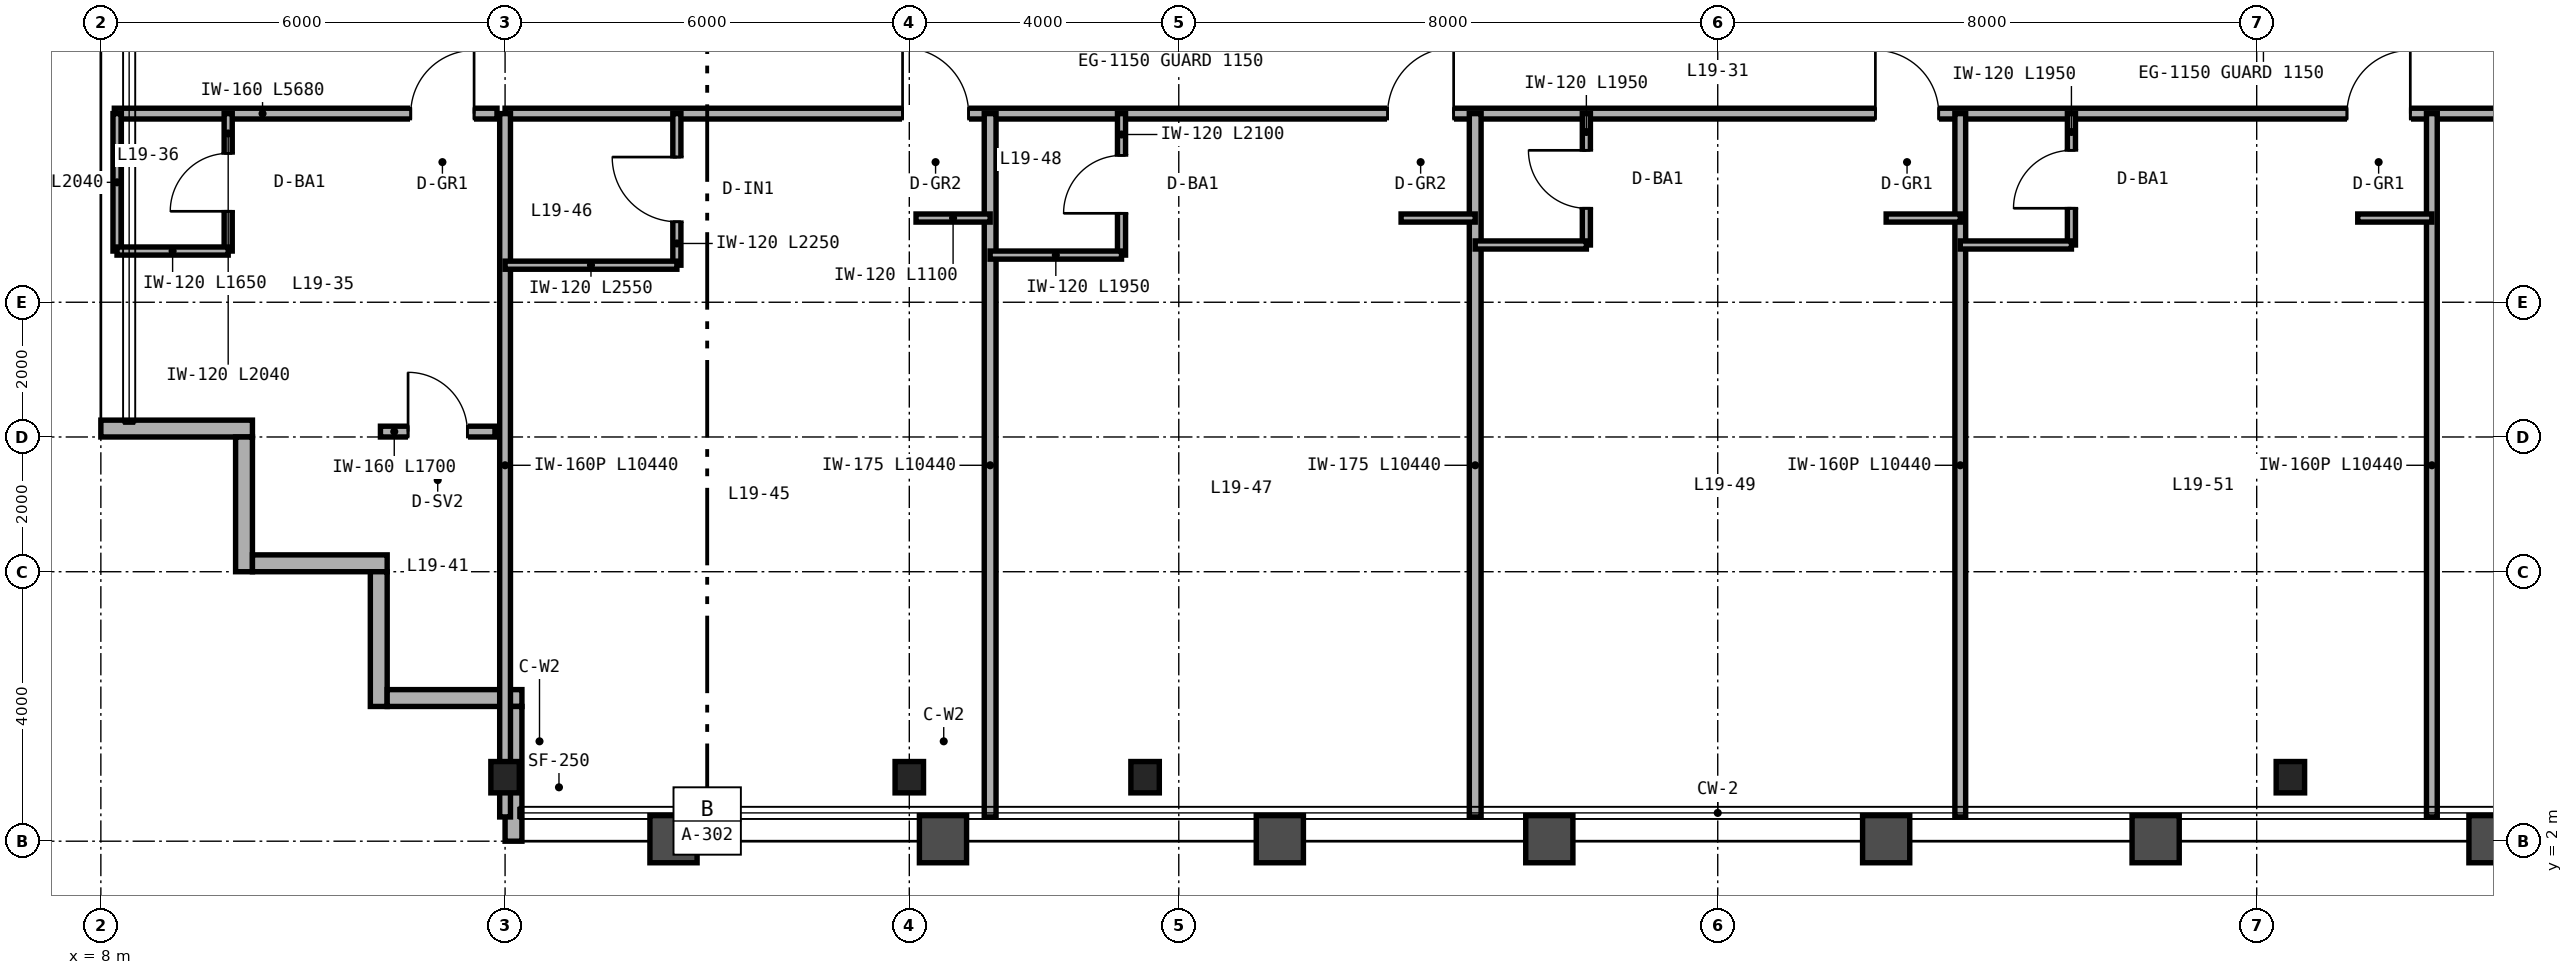
"""IFC4 building model, lengths in metres.
Left out: names, types, materials, properties, quantities, classifications, styles, units other than length and angle.
Written with IfcOpenShell. Run it as: python <this file> out.ifc"""

import sys

from ifc_helpers import new_model, si_unit, direction, frame, frame_2d, origin, origin_2d, place, context, subcontext, project, spatial, rectangle, i_section, extrude, source, transform, mapped, element, fill, save


model = new_model("IFC4")
c1 = context("Model", 3, precision=1e-05, world=origin(), true_north=direction((0.0, 1.0)))
c2 = subcontext(c1, "Body", "Model", "MODEL_VIEW")
j1 = project(units=[si_unit("LENGTHUNIT", "METRE"), si_unit("PLANEANGLEUNIT", "RADIAN")], contexts=[c1])
p1 = place(None, origin())
s1 = spatial("IfcSite", under=j1, at=p1, CompositionType="ELEMENT")
p2 = place(p1, origin())
s2 = spatial("IfcBuilding", under=s1, at=p2, CompositionType="ELEMENT")
p3 = place(p2, frame((0.0, 0.0, 78.0)))
s3 = spatial("IfcBuildingStorey", under=s2, at=p3, CompositionType="ELEMENT", Elevation=78.0)
m1 = source(origin(), c2, "Body", "SweptSolid", [
    extrude(i_section(OverallWidth=0.422, OverallDepth=0.465, WebThickness=0.045, FlangeThickness=0.073, FilletRadius=0.025, at=origin_2d()), origin(), (0.0, 0.0, 1.0), 3.35),
])
for number, where, z_axis, x_axis in (
    (1, (14.0, 2.95, 0.0), (0.0, 0.0, 1.0), (1.0, 0.0, 0.0)),
    (2, (20.0, 2.95, 0.0), (0.0, 0.0, 1.0), (1.0, 0.0, 0.0)),
    (3, (23.5, 2.95, 0.0), (0.0, 0.0, 1.0), (1.0, 0.0, 0.0)),
    (4, (40.5, 2.95, 0.0), (0.0, 0.0, 1.0), (1.0, 0.0, 0.0)),
):
    element("IfcColumn", number, at=place(p3, frame(where, z_axis=z_axis, x_axis=x_axis)), inside=s3, PredefinedType="COLUMN", context=c2, shape_type="MappedRepresentation", body=[
        mapped(m1, transform((0.0, 0.0, 0.0), scale=1.0)),
    ])
p4 = place(p3, frame((8.0, 8.125, 0.0), z_axis=(0.0, 0.0, 1.0), x_axis=(1.0, 0.0, 0.0)))
e5 = element("IfcWall", 5, at=p4, inside=s3, PredefinedType="SOLIDWALL", context=c2, shape_type="SweptSolid", body=[
    extrude(rectangle(XDim=2.25, YDim=0.25, at=frame_2d((1.125, 0.0))), origin(), (0.0, 0.0, 1.0), 3.35),
])
for number, where, z_axis, x_axis in (
    (6, (10.125, 8.0, 0.0), (0.0, 0.0, 1.0), (0.0, -1.0, 0.0)),
    (7, (10.25, 6.125, 0.0), (0.0, 0.0, 1.0), (1.0, 0.0, 0.0)),
    (8, (12.125, 6.0, 0.0), (0.0, 0.0, 1.0), (0.0, -1.0, 0.0)),
    (9, (12.25, 4.125, 0.0), (0.0, 0.0, 1.0), (1.0, 0.0, 0.0)),
):
    element("IfcWall", number, at=place(p3, frame(where, z_axis=z_axis, x_axis=x_axis)), inside=s3, PredefinedType="SOLIDWALL", context=c2, shape_type="SweptSolid", body=[
        extrude(rectangle(XDim=2.0, YDim=0.25, at=frame_2d((1.0, 0.0))), origin(), (0.0, 0.0, 1.0), 3.35),
    ])
p5 = place(p3, frame((14.125, 4.0, 0.0), z_axis=(0.0, 0.0, 1.0), x_axis=(0.0, -1.0, 0.0)))
e10 = element("IfcWall", 10, at=p5, inside=s3, PredefinedType="SOLIDWALL", context=c2, shape_type="SweptSolid", body=[
    extrude(rectangle(XDim=2.0, YDim=0.25, at=frame_2d((1.0, 0.0))), origin(), (0.0, 0.0, 1.0), 2.657),
])
p6 = place(p3, frame((8.2, 12.8, 0.0), z_axis=(0.0, 0.0, 1.0), x_axis=(1.0, 0.0, 0.0)))
e11 = element("IfcWall", 11, at=p6, inside=s3, PredefinedType="PARTITIONING", context=c2, shape_type="SweptSolid", body=[
    extrude(rectangle(XDim=5.68, YDim=0.16, at=frame_2d((2.84, 0.0))), origin(), (0.0, 0.0, 1.0), 3.35),
])
p7 = place(p6, frame((4.4, 0.0, 0.0)))
e12 = element("IfcOpeningElement", 12, at=p7, cuts=e11, PredefinedType="OPENING", context=c2, shape_type="SweptSolid", body=[
    extrude(rectangle(XDim=0.94, YDim=2.15, at=frame_2d((0.47, 1.075))), frame((0.0, 0.09, 0.0), z_axis=(0.0, -1.0, 0.0), x_axis=(1.0, 0.0, 0.0)), (0.0, 0.0, 1.0), 0.18),
])
p8 = place(p3, frame((9.89, 10.76, 0.0), z_axis=(0.0, 0.0, 1.0), x_axis=(0.0, 1.0, 0.0)))
e13 = element("IfcWall", 13, at=p8, inside=s3, PredefinedType="PARTITIONING", context=c2, shape_type="SweptSolid", body=[
    extrude(rectangle(XDim=2.04, YDim=0.12, at=frame_2d((1.02, 0.0))), origin(), (0.0, 0.0, 1.0), 3.35),
])
p9 = place(p8, frame((0.59, 0.0, 0.0)))
e14 = element("IfcOpeningElement", 14, at=p9, cuts=e13, PredefinedType="OPENING", context=c2, shape_type="SweptSolid", body=[
    extrude(rectangle(XDim=0.86, YDim=2.1, at=frame_2d((0.43, 1.05))), frame((0.0, 0.07, 0.0), z_axis=(0.0, -1.0, 0.0), x_axis=(1.0, 0.0, 0.0)), (0.0, 0.0, 1.0), 0.14),
])
p10 = place(p3, frame((8.24, 10.76, 0.0), z_axis=(0.0, 0.0, 1.0), x_axis=(0.0, 1.0, 0.0)))
e15 = element("IfcWall", 15, at=p10, inside=s3, PredefinedType="PARTITIONING", context=c2, shape_type="SweptSolid", body=[
    extrude(rectangle(XDim=2.04, YDim=0.12, at=frame_2d((1.02, 0.0))), origin(), (0.0, 0.0, 1.0), 3.35),
])
p11 = place(p3, frame((8.24, 10.76, 0.0), z_axis=(0.0, 0.0, 1.0), x_axis=(1.0, 0.0, 0.0)))
e16 = element("IfcWall", 16, at=p11, inside=s3, PredefinedType="PARTITIONING", context=c2, shape_type="SweptSolid", body=[
    extrude(rectangle(XDim=1.65, YDim=0.12, at=frame_2d((0.825, 0.0))), origin(), (0.0, 0.0, 1.0), 3.35),
])
p12 = place(p3, frame((12.15, 8.08, 0.0), z_axis=(0.0, 0.0, 1.0), x_axis=(1.0, 0.0, 0.0)))
e17 = element("IfcWall", 17, at=p12, inside=s3, PredefinedType="PARTITIONING", context=c2, shape_type="SweptSolid", body=[
    extrude(rectangle(XDim=1.7, YDim=0.16, at=frame_2d((0.85, 0.0))), origin(), (0.0, 0.0, 1.0), 3.35),
])
p13 = place(p12, frame((0.41, 0.0, 0.0)))
e18 = element("IfcOpeningElement", 18, at=p13, cuts=e17, PredefinedType="OPENING", context=c2, shape_type="SweptSolid", body=[
    extrude(rectangle(XDim=0.88, YDim=2.15, at=frame_2d((0.44, 1.075))), frame((0.0, 0.09, 0.0), z_axis=(0.0, -1.0, 0.0), x_axis=(1.0, 0.0, 0.0)), (0.0, 0.0, 1.0), 0.18),
])
p14 = place(p3, frame((14.0, 12.8, 0.0), z_axis=(0.0, 0.0, 1.0), x_axis=(1.0, 0.0, 0.0)))
e19 = element("IfcWall", 19, at=p14, inside=s3, PredefinedType="PARTITIONING", context=c2, shape_type="SweptSolid", body=[
    extrude(rectangle(XDim=36.0, YDim=0.16, at=frame_2d((18.0, 0.0))), origin(), (0.0, 0.0, 1.0), 2.571),
])
p15 = place(p14, frame((5.9, 0.0, 0.0)))
e20 = element("IfcOpeningElement", 20, at=p15, cuts=e19, PredefinedType="OPENING", context=c2, shape_type="SweptSolid", body=[
    extrude(rectangle(XDim=0.98, YDim=2.2, at=frame_2d((0.49, 1.1))), frame((0.0, 0.09, 0.0), z_axis=(0.0, -1.0, 0.0), x_axis=(1.0, 0.0, 0.0)), (0.0, 0.0, 1.0), 0.18),
])
p16 = place(p14, frame((13.1, 0.0, 0.0)))
e21 = element("IfcOpeningElement", 21, at=p16, cuts=e19, PredefinedType="OPENING", context=c2, shape_type="SweptSolid", body=[
    extrude(rectangle(XDim=0.98, YDim=2.2, at=frame_2d((0.49, 1.1))), frame((0.0, 0.09, 0.0), z_axis=(0.0, -1.0, 0.0), x_axis=(1.0, 0.0, 0.0)), (0.0, 0.0, 1.0), 0.18),
])
p17 = place(p14, frame((20.34, 0.0, 0.0)))
e22 = element("IfcOpeningElement", 22, at=p17, cuts=e19, PredefinedType="OPENING", context=c2, shape_type="SweptSolid", body=[
    extrude(rectangle(XDim=0.94, YDim=2.15, at=frame_2d((0.47, 1.075))), frame((0.0, 0.09, 0.0), z_axis=(0.0, -1.0, 0.0), x_axis=(1.0, 0.0, 0.0)), (0.0, 0.0, 1.0), 0.18),
])
p18 = place(p14, frame((27.34, 0.0, 0.0)))
e23 = element("IfcOpeningElement", 23, at=p18, cuts=e19, PredefinedType="OPENING", context=c2, shape_type="SweptSolid", body=[
    extrude(rectangle(XDim=0.94, YDim=2.15, at=frame_2d((0.47, 1.075))), frame((0.0, 0.09, 0.0), z_axis=(0.0, -1.0, 0.0), x_axis=(1.0, 0.0, 0.0)), (0.0, 0.0, 1.0), 0.18),
])
p19 = place(p14, frame((31.82, 0.0, 0.0)))
e24 = element("IfcOpeningElement", 24, at=p19, cuts=e19, PredefinedType="OPENING", context=c2, shape_type="SweptSolid", body=[
    extrude(rectangle(XDim=0.96, YDim=2.15, at=frame_2d((0.48, 1.075))), frame((0.0, 0.09, 0.0), z_axis=(0.0, -1.0, 0.0), x_axis=(1.0, 0.0, 0.0)), (0.0, 0.0, 1.0), 0.18),
])
p20 = place(p3, frame((14.0, 2.36, 0.0), z_axis=(0.0, 0.0, 1.0), x_axis=(0.0, 1.0, 0.0)))
e25 = element("IfcWall", 25, at=p20, inside=s3, PredefinedType="PARTITIONING", context=c2, shape_type="SweptSolid", body=[
    extrude(rectangle(XDim=10.44, YDim=0.16, at=frame_2d((5.22, 0.0))), origin(), (0.0, 0.0, 1.0), 2.657),
])
p21 = place(p3, frame((21.2, 2.36, 0.0), z_axis=(0.0, 0.0, 1.0), x_axis=(0.0, 1.0, 0.0)))
e26 = element("IfcWall", 26, at=p21, inside=s3, PredefinedType="PARTITIONING", context=c2, shape_type="SweptSolid", body=[
    extrude(rectangle(XDim=10.44, YDim=0.175, at=frame_2d((5.22, 0.0))), origin(), (0.0, 0.0, 1.0), 2.813),
])
p22 = place(p3, frame((16.55, 10.55, 0.0), z_axis=(0.0, 0.0, 1.0), x_axis=(0.0, 1.0, 0.0)))
e27 = element("IfcWall", 27, at=p22, inside=s3, PredefinedType="PARTITIONING", context=c2, shape_type="SweptSolid", body=[
    extrude(rectangle(XDim=2.25, YDim=0.12, at=frame_2d((1.125, 0.0))), origin(), (0.0, 0.0, 1.0), 3.35),
])
p23 = place(p22, frame((0.645, 0.0, 0.0)))
e28 = element("IfcOpeningElement", 28, at=p23, cuts=e27, PredefinedType="OPENING", context=c2, shape_type="SweptSolid", body=[
    extrude(rectangle(XDim=0.96, YDim=2.15, at=frame_2d((0.48, 1.075))), frame((0.0, 0.07, 0.0), z_axis=(0.0, -1.0, 0.0), x_axis=(1.0, 0.0, 0.0)), (0.0, 0.0, 1.0), 0.14),
])
p24 = place(p3, frame((14.0, 10.55, 0.0), z_axis=(0.0, 0.0, 1.0), x_axis=(1.0, 0.0, 0.0)))
e29 = element("IfcWall", 29, at=p24, inside=s3, PredefinedType="PARTITIONING", context=c2, shape_type="SweptSolid", body=[
    extrude(rectangle(XDim=2.55, YDim=0.12, at=frame_2d((1.275, 0.0))), origin(), (0.0, 0.0, 1.0), 3.35),
])
p25 = place(p3, frame((20.1, 11.25, 0.0), z_axis=(0.0, 0.0, 1.0), x_axis=(1.0, 0.0, 0.0)))
e30 = element("IfcWall", 30, at=p25, inside=s3, PredefinedType="PARTITIONING", context=c2, shape_type="SweptSolid", body=[
    extrude(rectangle(XDim=1.1, YDim=0.12, at=frame_2d((0.55, 0.0))), origin(), (0.0, 0.0, 1.0), 3.35),
])
p26 = place(p3, frame((28.4, 2.36, 0.0), z_axis=(0.0, 0.0, 1.0), x_axis=(0.0, 1.0, 0.0)))
e31 = element("IfcWall", 31, at=p26, inside=s3, PredefinedType="PARTITIONING", context=c2, shape_type="SweptSolid", body=[
    extrude(rectangle(XDim=10.44, YDim=0.175, at=frame_2d((5.22, 0.0))), origin(), (0.0, 0.0, 1.0), 2.423),
])
p27 = place(p3, frame((23.15, 10.7, 0.0), z_axis=(0.0, 0.0, 1.0), x_axis=(0.0, 1.0, 0.0)))
e32 = element("IfcWall", 32, at=p27, inside=s3, PredefinedType="PARTITIONING", context=c2, shape_type="SweptSolid", body=[
    extrude(rectangle(XDim=2.1, YDim=0.12, at=frame_2d((1.05, 0.0))), origin(), (0.0, 0.0, 1.0), 3.35),
])
p28 = place(p27, frame((0.62, 0.0, 0.0)))
e33 = element("IfcOpeningElement", 33, at=p28, cuts=e32, PredefinedType="OPENING", context=c2, shape_type="SweptSolid", body=[
    extrude(rectangle(XDim=0.86, YDim=2.1, at=frame_2d((0.43, 1.05))), frame((0.0, 0.07, 0.0), z_axis=(0.0, -1.0, 0.0), x_axis=(1.0, 0.0, 0.0)), (0.0, 0.0, 1.0), 0.14),
])
p29 = place(p3, frame((21.2, 10.7, 0.0), z_axis=(0.0, 0.0, 1.0), x_axis=(1.0, 0.0, 0.0)))
e34 = element("IfcWall", 34, at=p29, inside=s3, PredefinedType="PARTITIONING", context=c2, shape_type="SweptSolid", body=[
    extrude(rectangle(XDim=1.95, YDim=0.12, at=frame_2d((0.975, 0.0))), origin(), (0.0, 0.0, 1.0), 3.35),
])
p30 = place(p3, frame((27.3, 11.25, 0.0), z_axis=(0.0, 0.0, 1.0), x_axis=(1.0, 0.0, 0.0)))
e35 = element("IfcWall", 35, at=p30, inside=s3, PredefinedType="PARTITIONING", context=c2, shape_type="SweptSolid", body=[
    extrude(rectangle(XDim=1.1, YDim=0.12, at=frame_2d((0.55, 0.0))), origin(), (0.0, 0.0, 1.0), 3.35),
])
p31 = place(p3, frame((35.6, 2.36, 0.0), z_axis=(0.0, 0.0, 1.0), x_axis=(0.0, 1.0, 0.0)))
e36 = element("IfcWall", 36, at=p31, inside=s3, PredefinedType="PARTITIONING", context=c2, shape_type="SweptSolid", body=[
    extrude(rectangle(XDim=10.44, YDim=0.16, at=frame_2d((5.22, 0.0))), origin(), (0.0, 0.0, 1.0), 2.423),
])
p32 = place(p3, frame((30.05, 10.85, 0.0), z_axis=(0.0, 0.0, 1.0), x_axis=(0.0, 1.0, 0.0)))
e37 = element("IfcWall", 37, at=p32, inside=s3, PredefinedType="PARTITIONING", context=c2, shape_type="SweptSolid", body=[
    extrude(rectangle(XDim=1.95, YDim=0.12, at=frame_2d((0.975, 0.0))), origin(), (0.0, 0.0, 1.0), 3.35),
])
p33 = place(p32, frame((0.545, 0.0, 0.0)))
e38 = element("IfcOpeningElement", 38, at=p33, cuts=e37, PredefinedType="OPENING", context=c2, shape_type="SweptSolid", body=[
    extrude(rectangle(XDim=0.86, YDim=2.1, at=frame_2d((0.43, 1.05))), frame((0.0, 0.07, 0.0), z_axis=(0.0, -1.0, 0.0), x_axis=(1.0, 0.0, 0.0)), (0.0, 0.0, 1.0), 0.14),
])
p34 = place(p3, frame((28.4, 10.85, 0.0), z_axis=(0.0, 0.0, 1.0), x_axis=(1.0, 0.0, 0.0)))
e39 = element("IfcWall", 39, at=p34, inside=s3, PredefinedType="PARTITIONING", context=c2, shape_type="SweptSolid", body=[
    extrude(rectangle(XDim=1.65, YDim=0.12, at=frame_2d((0.825, 0.0))), origin(), (0.0, 0.0, 1.0), 3.35),
])
p35 = place(p3, frame((34.5, 11.25, 0.0), z_axis=(0.0, 0.0, 1.0), x_axis=(1.0, 0.0, 0.0)))
e40 = element("IfcWall", 40, at=p35, inside=s3, PredefinedType="PARTITIONING", context=c2, shape_type="SweptSolid", body=[
    extrude(rectangle(XDim=1.1, YDim=0.12, at=frame_2d((0.55, 0.0))), origin(), (0.0, 0.0, 1.0), 3.35),
])
p36 = place(p3, frame((42.6, 2.36, 0.0), z_axis=(0.0, 0.0, 1.0), x_axis=(0.0, 1.0, 0.0)))
e41 = element("IfcWall", 41, at=p36, inside=s3, PredefinedType="PARTITIONING", context=c2, shape_type="SweptSolid", body=[
    extrude(rectangle(XDim=10.44, YDim=0.16, at=frame_2d((5.22, 0.0))), origin(), (0.0, 0.0, 1.0), 2.813),
])
p37 = place(p3, frame((37.25, 10.85, 0.0), z_axis=(0.0, 0.0, 1.0), x_axis=(0.0, 1.0, 0.0)))
e42 = element("IfcWall", 42, at=p37, inside=s3, PredefinedType="PARTITIONING", context=c2, shape_type="SweptSolid", body=[
    extrude(rectangle(XDim=1.95, YDim=0.12, at=frame_2d((0.975, 0.0))), origin(), (0.0, 0.0, 1.0), 3.35),
])
p38 = place(p37, frame((0.545, 0.0, 0.0)))
e43 = element("IfcOpeningElement", 43, at=p38, cuts=e42, PredefinedType="OPENING", context=c2, shape_type="SweptSolid", body=[
    extrude(rectangle(XDim=0.86, YDim=2.1, at=frame_2d((0.43, 1.05))), frame((0.0, 0.07, 0.0), z_axis=(0.0, -1.0, 0.0), x_axis=(1.0, 0.0, 0.0)), (0.0, 0.0, 1.0), 0.14),
])
p39 = place(p3, frame((35.6, 10.85, 0.0), z_axis=(0.0, 0.0, 1.0), x_axis=(1.0, 0.0, 0.0)))
e44 = element("IfcWall", 44, at=p39, inside=s3, PredefinedType="PARTITIONING", context=c2, shape_type="SweptSolid", body=[
    extrude(rectangle(XDim=1.65, YDim=0.12, at=frame_2d((0.825, 0.0))), origin(), (0.0, 0.0, 1.0), 3.35),
])
p40 = place(p3, frame((41.5, 11.25, 0.0), z_axis=(0.0, 0.0, 1.0), x_axis=(1.0, 0.0, 0.0)))
e45 = element("IfcWall", 45, at=p40, inside=s3, PredefinedType="PARTITIONING", context=c2, shape_type="SweptSolid", body=[
    extrude(rectangle(XDim=1.1, YDim=0.12, at=frame_2d((0.55, 0.0))), origin(), (0.0, 0.0, 1.0), 3.35),
])
m2 = source(origin(), c2, "Body", "SweptSolid", [
    extrude(rectangle(XDim=0.86, YDim=2.1, at=frame_2d((0.43, 1.05))), frame((0.0, 0.025, 0.0), z_axis=(0.0, -1.0, 0.0), x_axis=(1.0, 0.0, 0.0)), (0.0, 0.0, 1.0), 0.05),
])
p41 = place(p9, origin())
e46 = element("IfcDoor", 46, at=p41, inside=s3, OperationType="SINGLE_SWING_LEFT", PredefinedType="DOOR", context=c2, shape_type="MappedRepresentation", body=[
    mapped(m2, transform((0.0, 0.0, 0.0), scale=1.0)),
])
fill(e14, e46)
m3 = source(origin(), c2, "Body", "SweptSolid", [
    extrude(rectangle(XDim=0.94, YDim=2.15, at=frame_2d((0.47, 1.075))), frame((0.0, 0.025, 0.0), z_axis=(0.0, -1.0, 0.0), x_axis=(1.0, 0.0, 0.0)), (0.0, 0.0, 1.0), 0.05),
])
p42 = place(p7, origin())
e47 = element("IfcDoor", 47, at=p42, inside=s3, OperationType="SINGLE_SWING_RIGHT", PredefinedType="DOOR", context=c2, shape_type="MappedRepresentation", body=[
    mapped(m3, transform((0.0, 0.0, 0.0), scale=1.0)),
])
fill(e12, e47)
m4 = source(origin(), c2, "Body", "SweptSolid", [
    extrude(rectangle(XDim=0.88, YDim=2.15, at=frame_2d((0.44, 1.075))), frame((0.0, 0.025, 0.0), z_axis=(0.0, -1.0, 0.0), x_axis=(1.0, 0.0, 0.0)), (0.0, 0.0, 1.0), 0.05),
])
p43 = place(p13, origin())
e48 = element("IfcDoor", 48, at=p43, inside=s3, OperationType="SINGLE_SWING_LEFT", PredefinedType="DOOR", context=c2, shape_type="MappedRepresentation", body=[
    mapped(m4, transform((0.0, 0.0, 0.0), scale=1.0)),
])
fill(e18, e48)
m5 = source(origin(), c2, "Body", "SweptSolid", [
    extrude(rectangle(XDim=0.96, YDim=2.15, at=frame_2d((0.48, 1.075))), frame((0.0, 0.025, 0.0), z_axis=(0.0, -1.0, 0.0), x_axis=(1.0, 0.0, 0.0)), (0.0, 0.0, 1.0), 0.05),
])
p44 = place(p23, origin())
e49 = element("IfcDoor", 49, at=p44, inside=s3, OperationType="SINGLE_SWING_RIGHT", PredefinedType="DOOR", context=c2, shape_type="MappedRepresentation", body=[
    mapped(m5, transform((0.0, 0.0, 0.0), scale=1.0)),
])
fill(e28, e49)
p45 = place(p28, origin())
e50 = element("IfcDoor", 50, at=p45, inside=s3, OperationType="SINGLE_SWING_LEFT", PredefinedType="DOOR", context=c2, shape_type="MappedRepresentation", body=[
    mapped(m2, transform((0.0, 0.0, 0.0), scale=1.0)),
])
fill(e33, e50)
p46 = place(p33, origin())
e51 = element("IfcDoor", 51, at=p46, inside=s3, OperationType="SINGLE_SWING_RIGHT", PredefinedType="DOOR", context=c2, shape_type="MappedRepresentation", body=[
    mapped(m2, transform((0.0, 0.0, 0.0), scale=1.0)),
])
fill(e38, e51)
p47 = place(p38, origin())
e52 = element("IfcDoor", 52, at=p47, inside=s3, OperationType="SINGLE_SWING_LEFT", PredefinedType="DOOR", context=c2, shape_type="MappedRepresentation", body=[
    mapped(m2, transform((0.0, 0.0, 0.0), scale=1.0)),
])
fill(e43, e52)
m6 = source(origin(), c2, "Body", "SweptSolid", [
    extrude(rectangle(XDim=0.98, YDim=2.2, at=frame_2d((0.49, 1.1))), frame((0.0, 0.025, 0.0), z_axis=(0.0, -1.0, 0.0), x_axis=(1.0, 0.0, 0.0)), (0.0, 0.0, 1.0), 0.05),
])
p48 = place(p15, origin())
e53 = element("IfcDoor", 53, at=p48, inside=s3, OperationType="SINGLE_SWING_LEFT", PredefinedType="DOOR", context=c2, shape_type="MappedRepresentation", body=[
    mapped(m6, transform((0.0, 0.0, 0.0), scale=1.0)),
])
fill(e20, e53)
p49 = place(p16, origin())
e54 = element("IfcDoor", 54, at=p49, inside=s3, OperationType="SINGLE_SWING_RIGHT", PredefinedType="DOOR", context=c2, shape_type="MappedRepresentation", body=[
    mapped(m6, transform((0.0, 0.0, 0.0), scale=1.0)),
])
fill(e21, e54)
p50 = place(p17, origin())
e55 = element("IfcDoor", 55, at=p50, inside=s3, OperationType="SINGLE_SWING_LEFT", PredefinedType="DOOR", context=c2, shape_type="MappedRepresentation", body=[
    mapped(m3, transform((0.0, 0.0, 0.0), scale=1.0)),
])
fill(e22, e55)
p51 = place(p18, origin())
e56 = element("IfcDoor", 56, at=p51, inside=s3, OperationType="SINGLE_SWING_RIGHT", PredefinedType="DOOR", context=c2, shape_type="MappedRepresentation", body=[
    mapped(m3, transform((0.0, 0.0, 0.0), scale=1.0)),
])
fill(e23, e56)
save(model, sys.argv[1])
